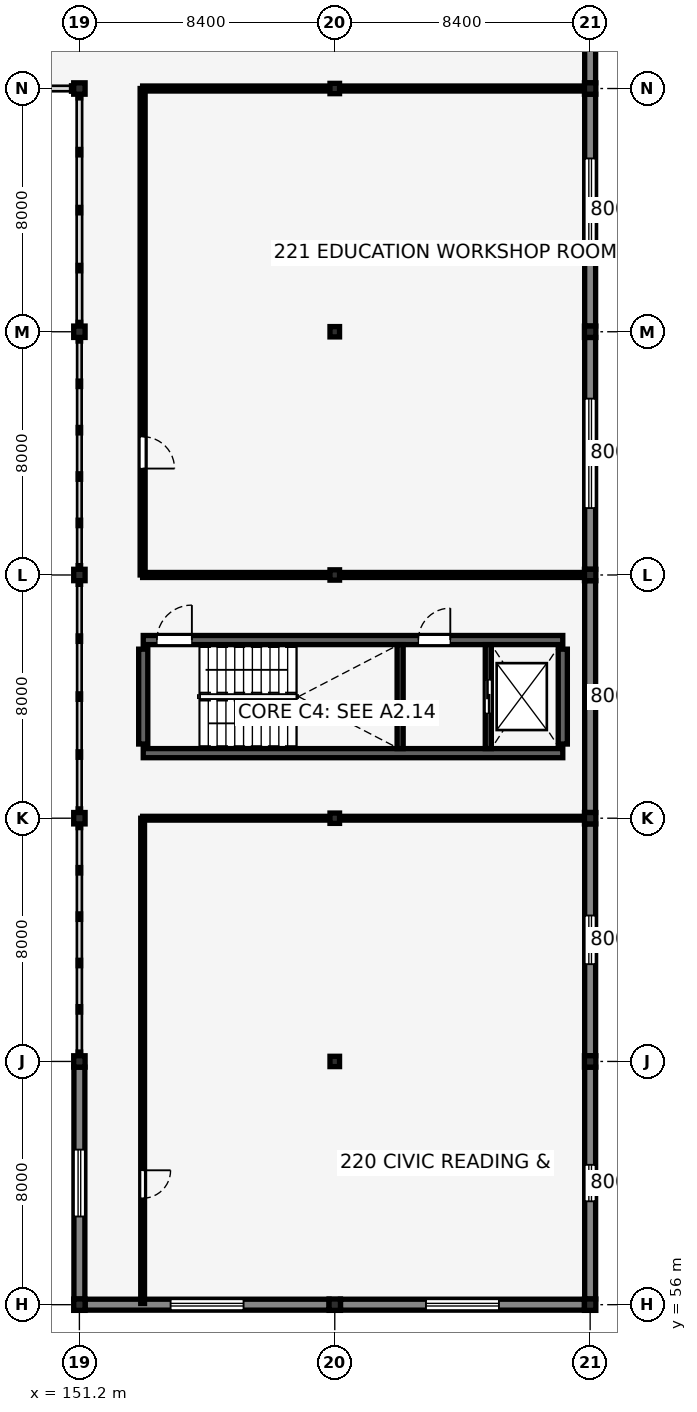
"""IFC4 building model, lengths in metres.
Left out: names, types, materials, properties, quantities, classifications, styles, units other than length and angle.
Written with IfcOpenShell. Run it as: python <this file> out.ifc"""

import sys

from ifc_helpers import new_model, si_unit, direction, frame, frame_2d, origin, origin_2d, place, context, subcontext, project, spatial, rectangle, i_section, extrude, element, fill, save


model = new_model("IFC4")
c1 = context("Model", 3, precision=1e-05, world=origin(), true_north=direction((0.0, 1.0)))
c2 = subcontext(c1, "Body", "Model", "MODEL_VIEW")
j1 = project(units=[si_unit("LENGTHUNIT", "METRE"), si_unit("PLANEANGLEUNIT", "RADIAN")], contexts=[c1])
p1 = place(None, origin())
s1 = spatial("IfcSite", under=j1, at=p1, CompositionType="ELEMENT")
p2 = place(p1, origin())
s2 = spatial("IfcBuilding", under=s1, at=p2, CompositionType="ELEMENT")
p3 = place(p2, frame((0.0, 0.0, 9.52)))
s3 = spatial("IfcBuildingStorey", under=s2, at=p3, CompositionType="ELEMENT", Elevation=9.52)
p4 = place(p3, frame((153.3, 74.14, 0.0), z_axis=(0.0, 0.0, 1.0), x_axis=(1.0, 0.0, 0.0)))
e1 = element("IfcWall", 1, at=p4, inside=s3, PredefinedType="SHEAR", context=c2, shape_type="SweptSolid", body=[
    extrude(rectangle(XDim=13.8, YDim=0.3, at=frame_2d((6.9, 0.0))), origin(), (0.0, 0.0, 1.0), 3.57),
])
p5 = place(p3, frame((153.3, 77.86, 0.0), z_axis=(0.0, 0.0, 1.0), x_axis=(1.0, 0.0, 0.0)))
e2 = element("IfcWall", 2, at=p5, inside=s3, PredefinedType="SHEAR", context=c2, shape_type="SweptSolid", body=[
    extrude(rectangle(XDim=13.8, YDim=0.3, at=frame_2d((6.9, 0.0))), origin(), (0.0, 0.0, 1.0), 3.57),
])
p6 = place(p5, frame((0.45, 0.0, 0.0), z_axis=(0.0, 0.0, 1.0), x_axis=(1.0, 0.0, 0.0)))
e3 = element("IfcOpeningElement", 3, at=p6, cuts=e2, PredefinedType="OPENING", context=c2, shape_type="SweptSolid", body=[
    extrude(rectangle(XDim=1.15, YDim=2.15, at=frame_2d((0.575, 1.075))), frame((0.0, 0.16, 0.0), z_axis=(0.0, -1.0, 0.0), x_axis=(1.0, 0.0, 0.0)), (0.0, 0.0, 1.0), 0.32),
])
p7 = place(p5, frame((9.05, 0.0, 0.0), z_axis=(0.0, 0.0, 1.0), x_axis=(1.0, 0.0, 0.0)))
e4 = element("IfcOpeningElement", 4, at=p7, cuts=e2, PredefinedType="OPENING", context=c2, shape_type="SweptSolid", body=[
    extrude(rectangle(XDim=1.05, YDim=2.15, at=frame_2d((0.525, 1.075))), frame((0.0, 0.16, 0.0), z_axis=(0.0, -1.0, 0.0), x_axis=(1.0, 0.0, 0.0)), (0.0, 0.0, 1.0), 0.32),
])
for number, where, z_axis, x_axis in (
    (5, (153.3, 74.44, 0.0), (0.0, 0.0, 1.0), (0.0, 1.0, 0.0)),
    (6, (167.1, 74.44, 0.0), (0.0, 0.0, 1.0), (0.0, 1.0, 0.0)),
):
    element("IfcWall", number, at=place(p3, frame(where, z_axis=z_axis, x_axis=x_axis)), inside=s3, PredefinedType="SHEAR", context=c2, shape_type="SweptSolid", body=[
        extrude(rectangle(XDim=3.12, YDim=0.3, at=frame_2d((1.56, 0.0))), origin(), (0.0, 0.0, 1.0), 3.57),
    ])
for number, where, z_axis, x_axis in (
    (7, (151.2, 56.0, 0.0), (0.0, 0.0, 1.0), (1.0, 0.0, 0.0)),
    (8, (151.2, 64.0, 0.0), (0.0, 0.0, 1.0), (1.0, 0.0, 0.0)),
    (9, (151.2, 72.0, 0.0), (0.0, 0.0, 1.0), (1.0, 0.0, 0.0)),
    (10, (151.2, 80.0, 0.0), (0.0, 0.0, 1.0), (1.0, 0.0, 0.0)),
    (11, (151.2, 88.0, 0.0), (0.0, 0.0, 1.0), (1.0, 0.0, 0.0)),
    (12, (151.2, 96.0, 0.0), (0.0, 0.0, 1.0), (1.0, 0.0, 0.0)),
    (13, (159.6, 56.0, 0.0), (0.0, 0.0, 1.0), (1.0, 0.0, 0.0)),
):
    element("IfcColumn", number, at=place(p3, frame(where, z_axis=z_axis, x_axis=x_axis)), inside=s3, PredefinedType="COLUMN", context=c2, shape_type="SweptSolid", body=[
        extrude(i_section(OverallWidth=0.375, OverallDepth=0.375, WebThickness=0.017, FlangeThickness=0.027, FilletRadius=0.015, at=origin_2d()), origin(), (0.0, 0.0, 1.0), 3.57),
    ])
for number, where, z_axis, x_axis in (
    (14, (159.6, 64.0, 0.0), (0.0, 0.0, 1.0), (1.0, 0.0, 0.0)),
    (15, (159.6, 72.0, 0.0), (0.0, 0.0, 1.0), (1.0, 0.0, 0.0)),
    (16, (159.6, 80.0, 0.0), (0.0, 0.0, 1.0), (1.0, 0.0, 0.0)),
    (17, (159.6, 88.0, 0.0), (0.0, 0.0, 1.0), (1.0, 0.0, 0.0)),
    (18, (159.6, 96.0, 0.0), (0.0, 0.0, 1.0), (1.0, 0.0, 0.0)),
):
    element("IfcColumn", number, at=place(p3, frame(where, z_axis=z_axis, x_axis=x_axis)), inside=s3, PredefinedType="COLUMN", context=c2, shape_type="SweptSolid", body=[
        extrude(i_section(OverallWidth=0.314, OverallDepth=0.34, WebThickness=0.019, FlangeThickness=0.031, FilletRadius=0.015, at=origin_2d()), origin(), (0.0, 0.0, 1.0), 3.57),
    ])
for number, where, z_axis, x_axis in (
    (19, (168.0, 56.0, 0.0), (0.0, 0.0, 1.0), (1.0, 0.0, 0.0)),
    (20, (168.0, 64.0, 0.0), (0.0, 0.0, 1.0), (1.0, 0.0, 0.0)),
    (21, (168.0, 72.0, 0.0), (0.0, 0.0, 1.0), (1.0, 0.0, 0.0)),
    (22, (168.0, 80.0, 0.0), (0.0, 0.0, 1.0), (1.0, 0.0, 0.0)),
    (23, (168.0, 88.0, 0.0), (0.0, 0.0, 1.0), (1.0, 0.0, 0.0)),
    (24, (168.0, 96.0, 0.0), (0.0, 0.0, 1.0), (1.0, 0.0, 0.0)),
):
    element("IfcColumn", number, at=place(p3, frame(where, z_axis=z_axis, x_axis=x_axis)), inside=s3, PredefinedType="COLUMN", context=c2, shape_type="SweptSolid", body=[
        extrude(i_section(OverallWidth=0.375, OverallDepth=0.375, WebThickness=0.017, FlangeThickness=0.027, FilletRadius=0.015, at=origin_2d()), origin(), (0.0, 0.0, 1.0), 3.57),
    ])
p8 = place(p3, frame((151.387, 56.0, 0.0), z_axis=(0.0, 0.0, 1.0), x_axis=(1.0, 0.0, 0.0)))
e25 = element("IfcWall", 25, at=p8, inside=s3, PredefinedType="SOLIDWALL", context=c2, shape_type="SweptSolid", body=[
    extrude(rectangle(XDim=8.025, YDim=0.36, at=frame_2d((4.013, 0.0))), origin(), (0.0, 0.0, 1.0), 3.27),
])
p9 = place(p8, frame((2.813, 0.0, 0.9), z_axis=(0.0, 0.0, 1.0), x_axis=(1.0, 0.0, 0.0)))
e26 = element("IfcOpeningElement", 26, at=p9, cuts=e25, PredefinedType="OPENING", context=c2, shape_type="SweptSolid", body=[
    extrude(rectangle(XDim=2.4, YDim=1.75, at=frame_2d((1.2, 0.875))), frame((0.0, 0.19, 0.0), z_axis=(0.0, -1.0, 0.0), x_axis=(1.0, 0.0, 0.0)), (0.0, 0.0, 1.0), 0.38),
])
p10 = place(p3, frame((159.787, 56.0, 0.0), z_axis=(0.0, 0.0, 1.0), x_axis=(1.0, 0.0, 0.0)))
e27 = element("IfcWall", 27, at=p10, inside=s3, PredefinedType="SOLIDWALL", context=c2, shape_type="SweptSolid", body=[
    extrude(rectangle(XDim=8.025, YDim=0.36, at=frame_2d((4.013, 0.0))), origin(), (0.0, 0.0, 1.0), 3.27),
])
p11 = place(p10, frame((2.813, 0.0, 0.9), z_axis=(0.0, 0.0, 1.0), x_axis=(1.0, 0.0, 0.0)))
e28 = element("IfcOpeningElement", 28, at=p11, cuts=e27, PredefinedType="OPENING", context=c2, shape_type="SweptSolid", body=[
    extrude(rectangle(XDim=2.4, YDim=1.5, at=frame_2d((1.2, 0.75))), frame((0.0, 0.19, 0.0), z_axis=(0.0, -1.0, 0.0), x_axis=(1.0, 0.0, 0.0)), (0.0, 0.0, 1.0), 0.38),
])
p12 = place(p3, frame((151.2, 56.187, 0.0), z_axis=(0.0, 0.0, 1.0), x_axis=(0.0, 1.0, 0.0)))
e29 = element("IfcWall", 29, at=p12, inside=s3, PredefinedType="SOLIDWALL", context=c2, shape_type="SweptSolid", body=[
    extrude(rectangle(XDim=7.625, YDim=0.36, at=frame_2d((3.813, 0.0))), origin(), (0.0, 0.0, 1.0), 3.219),
])
p13 = place(p12, frame((2.713, 0.0, 0.9), z_axis=(0.0, 0.0, 1.0), x_axis=(1.0, 0.0, 0.0)))
e30 = element("IfcOpeningElement", 30, at=p13, cuts=e29, PredefinedType="OPENING", context=c2, shape_type="SweptSolid", body=[
    extrude(rectangle(XDim=2.2, YDim=1.5, at=frame_2d((1.1, 0.75))), frame((0.0, 0.19, 0.0), z_axis=(0.0, -1.0, 0.0), x_axis=(1.0, 0.0, 0.0)), (0.0, 0.0, 1.0), 0.38),
])
p14 = place(p3, frame((168.0, 96.187, 0.0), z_axis=(0.0, 0.0, 1.0), x_axis=(0.0, 1.0, 0.0)))
e31 = element("IfcWall", 31, at=p14, inside=s3, PredefinedType="SOLIDWALL", context=c2, shape_type="SweptSolid", body=[
    extrude(rectangle(XDim=7.625, YDim=0.36, at=frame_2d((3.813, 0.0))), origin(), (0.0, 0.0, 1.0), 3.219),
])
p15 = place(p14, frame((3.338, 0.0, 0.65), z_axis=(0.0, 0.0, 1.0), x_axis=(1.0, 0.0, 0.0)))
e32 = element("IfcOpeningElement", 32, at=p15, cuts=e31, PredefinedType="OPENING", context=c2, shape_type="SweptSolid", body=[
    extrude(rectangle(XDim=0.95, YDim=2.1, at=frame_2d((0.475, 1.05))), frame((0.0, 0.19, 0.0), z_axis=(0.0, -1.0, 0.0), x_axis=(1.0, 0.0, 0.0)), (0.0, 0.0, 1.0), 0.38),
])
p16 = place(p3, frame((168.0, 56.187, 0.0), z_axis=(0.0, 0.0, 1.0), x_axis=(0.0, 1.0, 0.0)))
e33 = element("IfcWall", 33, at=p16, inside=s3, PredefinedType="SOLIDWALL", context=c2, shape_type="SweptSolid", body=[
    extrude(rectangle(XDim=7.625, YDim=0.36, at=frame_2d((3.813, 0.0))), origin(), (0.0, 0.0, 1.0), 3.219),
])
p17 = place(p16, frame((3.213, 0.0, 1.55), z_axis=(0.0, 0.0, 1.0), x_axis=(1.0, 0.0, 0.0)))
e34 = element("IfcOpeningElement", 34, at=p17, cuts=e33, PredefinedType="OPENING", context=c2, shape_type="SweptSolid", body=[
    extrude(rectangle(XDim=1.2, YDim=0.95, at=frame_2d((0.6, 0.475))), frame((0.0, 0.19, 0.0), z_axis=(0.0, -1.0, 0.0), x_axis=(1.0, 0.0, 0.0)), (0.0, 0.0, 1.0), 0.38),
])
p18 = place(p3, frame((168.0, 64.187, 0.0), z_axis=(0.0, 0.0, 1.0), x_axis=(0.0, 1.0, 0.0)))
e35 = element("IfcWall", 35, at=p18, inside=s3, PredefinedType="SOLIDWALL", context=c2, shape_type="SweptSolid", body=[
    extrude(rectangle(XDim=7.625, YDim=0.36, at=frame_2d((3.813, 0.0))), origin(), (0.0, 0.0, 1.0), 3.219),
])
p19 = place(p18, frame((3.013, 0.0, 0.9), z_axis=(0.0, 0.0, 1.0), x_axis=(1.0, 0.0, 0.0)))
e36 = element("IfcOpeningElement", 36, at=p19, cuts=e35, PredefinedType="OPENING", context=c2, shape_type="SweptSolid", body=[
    extrude(rectangle(XDim=1.6, YDim=1.2, at=frame_2d((0.8, 0.6))), frame((0.0, 0.19, 0.0), z_axis=(0.0, -1.0, 0.0), x_axis=(1.0, 0.0, 0.0)), (0.0, 0.0, 1.0), 0.38),
])
p20 = place(p3, frame((168.0, 72.187, 0.0), z_axis=(0.0, 0.0, 1.0), x_axis=(0.0, 1.0, 0.0)))
e37 = element("IfcWall", 37, at=p20, inside=s3, PredefinedType="SOLIDWALL", context=c2, shape_type="SweptSolid", body=[
    extrude(rectangle(XDim=7.625, YDim=0.36, at=frame_2d((3.813, 0.0))), origin(), (0.0, 0.0, 1.0), 3.27),
])
p21 = place(p3, frame((168.0, 80.187, 0.0), z_axis=(0.0, 0.0, 1.0), x_axis=(0.0, 1.0, 0.0)))
e38 = element("IfcWall", 38, at=p21, inside=s3, PredefinedType="SOLIDWALL", context=c2, shape_type="SweptSolid", body=[
    extrude(rectangle(XDim=7.625, YDim=0.36, at=frame_2d((3.813, 0.0))), origin(), (0.0, 0.0, 1.0), 3.219),
])
p22 = place(p21, frame((2.013, 0.0, 0.9), z_axis=(0.0, 0.0, 1.0), x_axis=(1.0, 0.0, 0.0)))
e39 = element("IfcOpeningElement", 39, at=p22, cuts=e38, PredefinedType="OPENING", context=c2, shape_type="SweptSolid", body=[
    extrude(rectangle(XDim=3.6, YDim=1.8, at=frame_2d((1.8, 0.9))), frame((0.0, 0.19, 0.0), z_axis=(0.0, -1.0, 0.0), x_axis=(1.0, 0.0, 0.0)), (0.0, 0.0, 1.0), 0.38),
])
p23 = place(p3, frame((168.0, 88.187, 0.0), z_axis=(0.0, 0.0, 1.0), x_axis=(0.0, 1.0, 0.0)))
e40 = element("IfcWall", 40, at=p23, inside=s3, PredefinedType="SOLIDWALL", context=c2, shape_type="SweptSolid", body=[
    extrude(rectangle(XDim=7.625, YDim=0.36, at=frame_2d((3.813, 0.0))), origin(), (0.0, 0.0, 1.0), 3.219),
])
p24 = place(p23, frame((2.113, 0.0, 0.9), z_axis=(0.0, 0.0, 1.0), x_axis=(1.0, 0.0, 0.0)))
e41 = element("IfcOpeningElement", 41, at=p24, cuts=e40, PredefinedType="OPENING", context=c2, shape_type="SweptSolid", body=[
    extrude(rectangle(XDim=3.4, YDim=1.7, at=frame_2d((1.7, 0.85))), frame((0.0, 0.19, 0.0), z_axis=(0.0, -1.0, 0.0), x_axis=(1.0, 0.0, 0.0)), (0.0, 0.0, 1.0), 0.38),
])
p25 = place(p3, frame((161.75, 74.29, 0.0), z_axis=(0.0, 0.0, 1.0), x_axis=(0.0, 1.0, 0.0)))
e42 = element("IfcWall", 42, at=p25, inside=s3, PredefinedType="SHEAR", context=c2, shape_type="SweptSolid", body=[
    extrude(rectangle(XDim=3.42, YDim=0.2, at=frame_2d((1.71, 0.0))), origin(), (0.0, 0.0, 1.0), 3.57),
])
p26 = place(p3, frame((164.65, 74.29, 0.0), z_axis=(0.0, 0.0, 1.0), x_axis=(0.0, 1.0, 0.0)))
e43 = element("IfcWall", 43, at=p26, inside=s3, PredefinedType="SHEAR", context=c2, shape_type="SweptSolid", body=[
    extrude(rectangle(XDim=3.42, YDim=0.2, at=frame_2d((1.71, 0.0))), origin(), (0.0, 0.0, 1.0), 3.57),
])
p27 = place(p26, frame((1.16, 0.0, 0.0), z_axis=(0.0, 0.0, 1.0), x_axis=(1.0, 0.0, 0.0)))
e44 = element("IfcOpeningElement", 44, at=p27, cuts=e43, PredefinedType="OPENING", context=c2, shape_type="SweptSolid", body=[
    extrude(rectangle(XDim=1.1, YDim=2.15, at=frame_2d((0.55, 1.075))), frame((0.0, 0.11, 0.0), z_axis=(0.0, -1.0, 0.0), x_axis=(1.0, 0.0, 0.0)), (0.0, 0.0, 1.0), 0.22),
])
p28 = place(p3, frame((153.28, 56.04, 0.0), z_axis=(0.0, 0.0, 1.0), x_axis=(0.0, 1.0, 0.0)))
e45 = element("IfcWall", 45, at=p28, inside=s3, PredefinedType="PARTITIONING", context=c2, shape_type="SweptSolid", body=[
    extrude(rectangle(XDim=15.96, YDim=0.125, at=frame_2d((7.98, 0.0))), origin(), (0.0, 0.0, 1.0), 3.57),
])
p29 = place(p28, frame((4.38, 0.0, 0.0), z_axis=(0.0, 0.0, 1.0), x_axis=(-1.0, 0.0, 0.0)))
e46 = element("IfcOpeningElement", 46, at=p29, cuts=e45, PredefinedType="OPENING", context=c2, shape_type="SweptSolid", body=[
    extrude(rectangle(XDim=0.92, YDim=2.12, at=frame_2d((0.46, 1.06))), frame((0.0, 0.073, 0.0), z_axis=(0.0, -1.0, 0.0), x_axis=(1.0, 0.0, 0.0)), (0.0, 0.0, 1.0), 0.145),
])
p30 = place(p3, frame((153.28, 80.0, 0.0), z_axis=(0.0, 0.0, 1.0), x_axis=(0.0, 1.0, 0.0)))
e47 = element("IfcWall", 47, at=p30, inside=s3, PredefinedType="PARTITIONING", context=c2, shape_type="SweptSolid", body=[
    extrude(rectangle(XDim=16.0, YDim=0.165, at=frame_2d((8.0, 0.0))), origin(), (0.0, 0.0, 1.0), 3.57),
])
p31 = place(p30, frame((4.55, 0.0, 0.0), z_axis=(0.0, 0.0, 1.0), x_axis=(-1.0, 0.0, 0.0)))
e48 = element("IfcOpeningElement", 48, at=p31, cuts=e47, PredefinedType="OPENING", context=c2, shape_type="SweptSolid", body=[
    extrude(rectangle(XDim=1.05, YDim=2.15, at=frame_2d((0.525, 1.075))), frame((0.0, 0.093, 0.0), z_axis=(0.0, -1.0, 0.0), x_axis=(1.0, 0.0, 0.0)), (0.0, 0.0, 1.0), 0.185),
])
p32 = place(p3, frame((153.28, 72.0, 0.0), z_axis=(0.0, 0.0, 1.0), x_axis=(1.0, 0.0, 0.0)))
e49 = element("IfcWall", 49, at=p32, inside=s3, PredefinedType="PARTITIONING", context=c2, shape_type="SweptSolid", body=[
    extrude(rectangle(XDim=6.173, YDim=0.125, at=frame_2d((3.086, 0.0))), origin(), (0.0, 0.0, 1.0), 3.037),
])
p33 = place(p3, frame((159.747, 72.0, 0.0), z_axis=(0.0, 0.0, 1.0), x_axis=(1.0, 0.0, 0.0)))
e50 = element("IfcWall", 50, at=p33, inside=s3, PredefinedType="PARTITIONING", context=c2, shape_type="SweptSolid", body=[
    extrude(rectangle(XDim=8.075, YDim=0.125, at=frame_2d((4.038, 0.0))), origin(), (0.0, 0.0, 1.0), 3.037),
])
p34 = place(p3, frame((153.28, 80.0, 0.0), z_axis=(0.0, 0.0, 1.0), x_axis=(1.0, 0.0, 0.0)))
e51 = element("IfcWall", 51, at=p34, inside=s3, PredefinedType="PARTITIONING", context=c2, shape_type="SweptSolid", body=[
    extrude(rectangle(XDim=6.173, YDim=0.165, at=frame_2d((3.086, 0.0))), origin(), (0.0, 0.0, 1.0), 3.037),
])
p35 = place(p3, frame((159.747, 80.0, 0.0), z_axis=(0.0, 0.0, 1.0), x_axis=(1.0, 0.0, 0.0)))
e52 = element("IfcWall", 52, at=p35, inside=s3, PredefinedType="PARTITIONING", context=c2, shape_type="SweptSolid", body=[
    extrude(rectangle(XDim=8.075, YDim=0.165, at=frame_2d((4.038, 0.0))), origin(), (0.0, 0.0, 1.0), 3.037),
])
p36 = place(p3, frame((153.28, 96.0, 0.0), z_axis=(0.0, 0.0, 1.0), x_axis=(1.0, 0.0, 0.0)))
e53 = element("IfcWall", 53, at=p36, inside=s3, PredefinedType="PARTITIONING", context=c2, shape_type="SweptSolid", body=[
    extrude(rectangle(XDim=6.173, YDim=0.165, at=frame_2d((3.086, 0.0))), origin(), (0.0, 0.0, 1.0), 3.037),
])
p37 = place(p3, frame((159.747, 96.0, 0.0), z_axis=(0.0, 0.0, 1.0), x_axis=(1.0, 0.0, 0.0)))
e54 = element("IfcWall", 54, at=p37, inside=s3, PredefinedType="PARTITIONING", context=c2, shape_type="SweptSolid", body=[
    extrude(rectangle(XDim=8.075, YDim=0.165, at=frame_2d((4.038, 0.0))), origin(), (0.0, 0.0, 1.0), 3.037),
])
p38 = place(p9, origin())
e55 = element("IfcWindow", 55, at=p38, inside=s3, PartitioningType="DOUBLE_PANEL_VERTICAL", PredefinedType="WINDOW", context=c2, shape_type="SweptSolid", body=[
    extrude(rectangle(XDim=2.4, YDim=1.75, at=frame_2d((1.2, 0.875))), frame((0.0, 0.03, 0.0), z_axis=(0.0, -1.0, 0.0), x_axis=(1.0, 0.0, 0.0)), (0.0, 0.0, 1.0), 0.06),
])
fill(e26, e55)
p39 = place(p11, origin())
e56 = element("IfcWindow", 56, at=p39, inside=s3, PartitioningType="DOUBLE_PANEL_VERTICAL", PredefinedType="WINDOW", context=c2, shape_type="SweptSolid", body=[
    extrude(rectangle(XDim=2.4, YDim=1.5, at=frame_2d((1.2, 0.75))), frame((0.0, 0.03, 0.0), z_axis=(0.0, -1.0, 0.0), x_axis=(1.0, 0.0, 0.0)), (0.0, 0.0, 1.0), 0.06),
])
fill(e28, e56)
p40 = place(p13, origin())
e57 = element("IfcWindow", 57, at=p40, inside=s3, PartitioningType="DOUBLE_PANEL_VERTICAL", PredefinedType="WINDOW", context=c2, shape_type="SweptSolid", body=[
    extrude(rectangle(XDim=2.2, YDim=1.5, at=frame_2d((1.1, 0.75))), frame((0.0, 0.03, 0.0), z_axis=(0.0, -1.0, 0.0), x_axis=(1.0, 0.0, 0.0)), (0.0, 0.0, 1.0), 0.06),
])
fill(e30, e57)
p41 = place(p17, origin())
e58 = element("IfcWindow", 58, at=p41, inside=s3, PartitioningType="SINGLE_PANEL", PredefinedType="WINDOW", context=c2, shape_type="SweptSolid", body=[
    extrude(rectangle(XDim=1.2, YDim=0.95, at=frame_2d((0.6, 0.475))), frame((0.0, 0.03, 0.0), z_axis=(0.0, -1.0, 0.0), x_axis=(1.0, 0.0, 0.0)), (0.0, 0.0, 1.0), 0.06),
])
fill(e34, e58)
p42 = place(p19, origin())
e59 = element("IfcWindow", 59, at=p42, inside=s3, PartitioningType="DOUBLE_PANEL_VERTICAL", PredefinedType="WINDOW", context=c2, shape_type="SweptSolid", body=[
    extrude(rectangle(XDim=1.6, YDim=1.2, at=frame_2d((0.8, 0.6))), frame((0.0, 0.03, 0.0), z_axis=(0.0, -1.0, 0.0), x_axis=(1.0, 0.0, 0.0)), (0.0, 0.0, 1.0), 0.06),
])
fill(e36, e59)
p43 = place(p22, origin())
e60 = element("IfcWindow", 60, at=p43, inside=s3, PartitioningType="TRIPLE_PANEL_VERTICAL", PredefinedType="WINDOW", context=c2, shape_type="SweptSolid", body=[
    extrude(rectangle(XDim=3.6, YDim=1.8, at=frame_2d((1.8, 0.9))), frame((0.0, 0.03, 0.0), z_axis=(0.0, -1.0, 0.0), x_axis=(1.0, 0.0, 0.0)), (0.0, 0.0, 1.0), 0.06),
])
fill(e39, e60)
p44 = place(p24, origin())
e61 = element("IfcWindow", 61, at=p44, inside=s3, PartitioningType="TRIPLE_PANEL_VERTICAL", PredefinedType="WINDOW", context=c2, shape_type="SweptSolid", body=[
    extrude(rectangle(XDim=3.4, YDim=1.7, at=frame_2d((1.7, 0.85))), frame((0.0, 0.03, 0.0), z_axis=(0.0, -1.0, 0.0), x_axis=(1.0, 0.0, 0.0)), (0.0, 0.0, 1.0), 0.06),
])
fill(e41, e61)
p45 = place(p6, origin())
e62 = element("IfcDoor", 62, at=p45, inside=s3, OperationType="SINGLE_SWING_RIGHT", PredefinedType="DOOR", context=c2, shape_type="SweptSolid", body=[
    extrude(rectangle(XDim=1.15, YDim=2.15, at=frame_2d((0.575, 1.075))), frame((0.0, 0.025, 0.0), z_axis=(0.0, -1.0, 0.0), x_axis=(1.0, 0.0, 0.0)), (0.0, 0.0, 1.0), 0.05),
])
fill(e3, e62)
p46 = place(p7, origin())
e63 = element("IfcDoor", 63, at=p46, inside=s3, OperationType="SINGLE_SWING_RIGHT", PredefinedType="DOOR", context=c2, shape_type="SweptSolid", body=[
    extrude(rectangle(XDim=1.05, YDim=2.15, at=frame_2d((0.525, 1.075))), frame((0.0, 0.025, 0.0), z_axis=(0.0, -1.0, 0.0), x_axis=(1.0, 0.0, 0.0)), (0.0, 0.0, 1.0), 0.05),
])
fill(e4, e63)
p47 = place(p27, origin())
e64 = element("IfcDoor", 64, at=p47, inside=s3, OperationType="DOUBLE_DOOR_SLIDING", PredefinedType="DOOR", context=c2, shape_type="SweptSolid", body=[
    extrude(rectangle(XDim=1.1, YDim=2.15, at=frame_2d((0.55, 1.075))), frame((0.0, 0.025, 0.0), z_axis=(0.0, -1.0, 0.0), x_axis=(1.0, 0.0, 0.0)), (0.0, 0.0, 1.0), 0.05),
])
fill(e44, e64)
p48 = place(p29, origin())
e65 = element("IfcDoor", 65, at=p48, inside=s3, OperationType="SINGLE_SWING_LEFT", PredefinedType="DOOR", context=c2, shape_type="SweptSolid", body=[
    extrude(rectangle(XDim=0.92, YDim=2.12, at=frame_2d((0.46, 1.06))), frame((0.0, 0.025, 0.0), z_axis=(0.0, -1.0, 0.0), x_axis=(1.0, 0.0, 0.0)), (0.0, 0.0, 1.0), 0.05),
])
fill(e46, e65)
p49 = place(p31, origin())
e66 = element("IfcDoor", 66, at=p49, inside=s3, OperationType="SINGLE_SWING_RIGHT", PredefinedType="DOOR", context=c2, shape_type="SweptSolid", body=[
    extrude(rectangle(XDim=1.05, YDim=2.15, at=frame_2d((0.525, 1.075))), frame((0.0, 0.025, 0.0), z_axis=(0.0, -1.0, 0.0), x_axis=(1.0, 0.0, 0.0)), (0.0, 0.0, 1.0), 0.05),
])
fill(e48, e66)
save(model, sys.argv[1])
